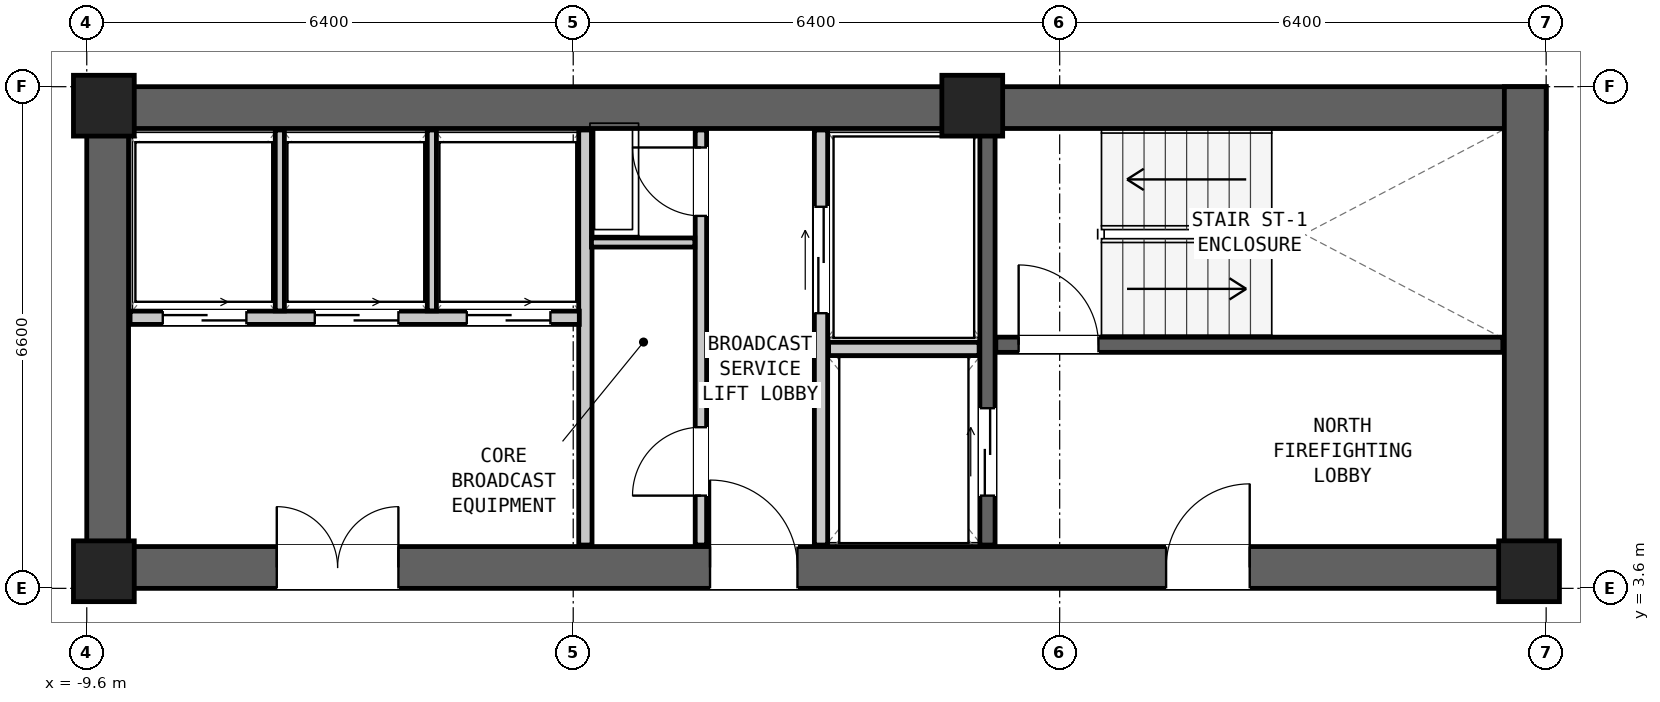
"""IFC4 building model, lengths in metres.
Left out: names, types, materials, properties, quantities, classifications, styles, units other than length and angle.
Written with IfcOpenShell. Run it as: python <this file> out.ifc"""

import sys

from ifc_helpers import new_model, si_unit, direction, frame, frame_2d, origin, origin_2d, place, context, subcontext, project, spatial, rectangle, extrude, element, fill, save


model = new_model("IFC4")
c1 = context("Model", 3, precision=1e-05, world=origin(), true_north=direction((0.0, 1.0)))
c2 = subcontext(c1, "Body", "Model", "MODEL_VIEW")
j1 = project(units=[si_unit("LENGTHUNIT", "METRE"), si_unit("PLANEANGLEUNIT", "RADIAN")], contexts=[c1])
p1 = place(None, origin())
s1 = spatial("IfcSite", under=j1, at=p1, CompositionType="ELEMENT")
p2 = place(p1, origin())
s2 = spatial("IfcBuilding", under=s1, at=p2, CompositionType="ELEMENT")
p3 = place(p2, frame((0.0, 0.0, 29.15)))
s3 = spatial("IfcBuildingStorey", under=s2, at=p3, CompositionType="ELEMENT", Elevation=29.15)
p4 = place(p3, frame((-9.6, 9.925, 0.0), z_axis=(0.0, 0.0, 1.0), x_axis=(1.0, 0.0, 0.0)))
e1 = element("IfcWall", 1, at=p4, inside=s3, PredefinedType="SHEAR", context=c2, shape_type="SweptSolid", body=[
    extrude(rectangle(XDim=19.2, YDim=0.55, at=frame_2d((9.6, 0.0))), origin(), (0.0, 0.0, 1.0), 3.05),
])
p5 = place(p3, frame((-9.6, 3.875, 0.0), z_axis=(0.0, 0.0, 1.0), x_axis=(1.0, 0.0, 0.0)))
e2 = element("IfcWall", 2, at=p5, inside=s3, PredefinedType="SHEAR", context=c2, shape_type="SweptSolid", body=[
    extrude(rectangle(XDim=19.2, YDim=0.55, at=frame_2d((9.6, 0.0))), origin(), (0.0, 0.0, 1.0), 3.05),
])
p6 = place(p5, frame((14.2, 0.0, 0.0)))
e3 = element("IfcOpeningElement", 3, at=p6, cuts=e2, PredefinedType="OPENING", context=c2, shape_type="SweptSolid", body=[
    extrude(rectangle(XDim=1.1, YDim=2.08, at=frame_2d((0.55, 1.04))), frame((0.0, 0.287, 0.0), z_axis=(0.0, -1.0, 0.0), x_axis=(1.0, 0.0, 0.0)), (0.0, 0.0, 1.0), 0.574),
])
p7 = place(p5, frame((8.2, 0.0, 0.0)))
e4 = element("IfcOpeningElement", 4, at=p7, cuts=e2, PredefinedType="OPENING", context=c2, shape_type="SweptSolid", body=[
    extrude(rectangle(XDim=1.15, YDim=2.1, at=frame_2d((0.575, 1.05))), frame((0.0, 0.287, 0.0), z_axis=(0.0, -1.0, 0.0), x_axis=(1.0, 0.0, 0.0)), (0.0, 0.0, 1.0), 0.574),
])
p8 = place(p5, frame((2.5, 0.0, 0.0)))
e5 = element("IfcOpeningElement", 5, at=p8, cuts=e2, PredefinedType="OPENING", context=c2, shape_type="SweptSolid", body=[
    extrude(rectangle(XDim=1.6, YDim=2.12, at=frame_2d((0.8, 1.06))), frame((0.0, 0.287, 0.0), z_axis=(0.0, -1.0, 0.0), x_axis=(1.0, 0.0, 0.0)), (0.0, 0.0, 1.0), 0.574),
])
for number, where, z_axis, x_axis in (
    (6, (-9.325, 3.6, 0.0), (0.0, 0.0, 1.0), (0.0, 1.0, 0.0)),
    (7, (9.325, 3.6, 0.0), (0.0, 0.0, 1.0), (0.0, 1.0, 0.0)),
):
    element("IfcWall", number, at=place(p3, frame(where, z_axis=z_axis, x_axis=x_axis)), inside=s3, PredefinedType="SHEAR", context=c2, shape_type="SweptSolid", body=[
        extrude(rectangle(XDim=6.6, YDim=0.55, at=frame_2d((3.3, 0.0))), origin(), (0.0, 0.0, 1.0), 3.05),
    ])
for number, where, z_axis, x_axis in (
    (8, (-9.375, 9.95, 0.0), (0.0, 0.0, 1.0), (1.0, 0.0, 0.0)),
    (9, (2.05, 9.95, 0.0), (0.0, 0.0, 1.0), (1.0, 0.0, 0.0)),
    (10, (-9.375, 3.825, 0.0), (0.0, 0.0, 1.0), (1.0, 0.0, 0.0)),
    (11, (9.375, 3.825, 0.0), (0.0, 0.0, 1.0), (1.0, 0.0, 0.0)),
):
    element("IfcColumn", number, at=place(p3, frame(where, z_axis=z_axis, x_axis=x_axis)), inside=s3, PredefinedType="COLUMN", context=c2, shape_type="SweptSolid", body=[
        extrude(rectangle(XDim=0.8, YDim=0.8, at=origin_2d()), origin(), (0.0, 0.0, 1.0), 3.05),
    ])
p9 = place(p3, frame((2.36, 6.805, 0.0), z_axis=(0.0, 0.0, 1.0), x_axis=(1.0, 0.0, 0.0)))
e12 = element("IfcWall", 12, at=p9, inside=s3, PredefinedType="SHEAR", context=c2, shape_type="SweptSolid", body=[
    extrude(rectangle(XDim=6.67, YDim=0.2, at=frame_2d((3.335, 0.0))), origin(), (0.0, 0.0, 1.0), 2.83),
])
p10 = place(p9, frame((0.3, 0.0, 0.0)))
e13 = element("IfcOpeningElement", 13, at=p10, cuts=e12, PredefinedType="OPENING", context=c2, shape_type="SweptSolid", body=[
    extrude(rectangle(XDim=1.05, YDim=2.08, at=frame_2d((0.525, 1.04))), frame((0.0, 0.112, 0.0), z_axis=(0.0, -1.0, 0.0), x_axis=(1.0, 0.0, 0.0)), (0.0, 0.0, 1.0), 0.224),
])
p11 = place(p3, frame((2.25, 4.17, 0.0), z_axis=(0.0, 0.0, 1.0), x_axis=(0.0, 1.0, 0.0)))
e14 = element("IfcWall", 14, at=p11, inside=s3, PredefinedType="SHEAR", context=c2, shape_type="SweptSolid", body=[
    extrude(rectangle(XDim=5.46, YDim=0.2, at=frame_2d((2.73, 0.0))), origin(), (0.0, 0.0, 1.0), 2.83),
])
p12 = place(p11, frame((0.65, 0.0, 0.0)))
e15 = element("IfcOpeningElement", 15, at=p12, cuts=e14, PredefinedType="OPENING", context=c2, shape_type="SweptSolid", body=[
    extrude(rectangle(XDim=1.15, YDim=2.08, at=frame_2d((0.575, 1.04))), frame((0.0, 0.112, 0.0), z_axis=(0.0, -1.0, 0.0), x_axis=(1.0, 0.0, 0.0)), (0.0, 0.0, 1.0), 0.224),
])
p13 = place(p3, frame((0.06, 4.17, 0.0), z_axis=(0.0, 0.0, 1.0), x_axis=(0.0, 1.0, 0.0)))
e16 = element("IfcWall", 16, at=p13, inside=s3, PredefinedType="PARTITIONING", context=c2, shape_type="SweptSolid", body=[
    extrude(rectangle(XDim=5.46, YDim=0.175, at=frame_2d((2.73, 0.0))), origin(), (0.0, 0.0, 1.0), 2.83),
])
p14 = place(p13, frame((3.05, 0.0, 0.0)))
e17 = element("IfcOpeningElement", 17, at=p14, cuts=e16, PredefinedType="OPENING", context=c2, shape_type="SweptSolid", body=[
    extrude(rectangle(XDim=1.4, YDim=2.12, at=frame_2d((0.7, 1.06))), frame((0.0, 0.1, 0.0), z_axis=(0.0, -1.0, 0.0), x_axis=(1.0, 0.0, 0.0)), (0.0, 0.0, 1.0), 0.199),
])
p15 = place(p3, frame((0.16, 6.75, 0.0), z_axis=(0.0, 0.0, 1.0), x_axis=(1.0, 0.0, 0.0)))
e18 = element("IfcWall", 18, at=p15, inside=s3, PredefinedType="PARTITIONING", context=c2, shape_type="SweptSolid", body=[
    extrude(rectangle(XDim=1.98, YDim=0.175, at=frame_2d((0.99, 0.0))), origin(), (0.0, 0.0, 1.0), 2.83),
])
p16 = place(p3, frame((-3.04, 4.17, 0.0), z_axis=(0.0, 0.0, 1.0), x_axis=(0.0, 1.0, 0.0)))
e19 = element("IfcWall", 19, at=p16, inside=s3, PredefinedType="PARTITIONING", context=c2, shape_type="SweptSolid", body=[
    extrude(rectangle(XDim=5.46, YDim=0.175, at=frame_2d((2.73, 0.0))), origin(), (0.0, 0.0, 1.0), 2.83),
])
p17 = place(p3, frame((-1.52, 4.17, 0.0), z_axis=(0.0, 0.0, 1.0), x_axis=(0.0, 1.0, 0.0)))
e20 = element("IfcWall", 20, at=p17, inside=s3, PredefinedType="PARTITIONING", context=c2, shape_type="SweptSolid", body=[
    extrude(rectangle(XDim=5.46, YDim=0.15, at=frame_2d((2.73, 0.0))), origin(), (0.0, 0.0, 1.0), 2.83),
])
p18 = place(p17, frame((4.33, 0.0, 0.0)))
e21 = element("IfcOpeningElement", 21, at=p18, cuts=e20, PredefinedType="OPENING", context=c2, shape_type="SweptSolid", body=[
    extrude(rectangle(XDim=0.9, YDim=2.05, at=frame_2d((0.45, 1.025))), frame((0.0, 0.087, 0.0), z_axis=(0.0, -1.0, 0.0), x_axis=(1.0, 0.0, 0.0)), (0.0, 0.0, 1.0), 0.174),
])
p19 = place(p17, frame((0.65, 0.0, 0.0)))
e22 = element("IfcOpeningElement", 22, at=p19, cuts=e20, PredefinedType="OPENING", context=c2, shape_type="SweptSolid", body=[
    extrude(rectangle(XDim=0.9, YDim=2.05, at=frame_2d((0.45, 1.025))), frame((0.0, 0.087, 0.0), z_axis=(0.0, -1.0, 0.0), x_axis=(1.0, 0.0, 0.0)), (0.0, 0.0, 1.0), 0.174),
])
p20 = place(p3, frame((-2.96, 8.15, 0.0), z_axis=(0.0, 0.0, 1.0), x_axis=(1.0, 0.0, 0.0)))
e23 = element("IfcWall", 23, at=p20, inside=s3, PredefinedType="PARTITIONING", context=c2, shape_type="SweptSolid", body=[
    extrude(rectangle(XDim=1.36, YDim=0.12, at=frame_2d((0.68, 0.0))), origin(), (0.0, 0.0, 1.0), 2.83),
])
p21 = place(p3, frame((-9.03, 7.16, 0.0), z_axis=(0.0, 0.0, 1.0), x_axis=(1.0, 0.0, 0.0)))
e24 = element("IfcWall", 24, at=p21, inside=s3, PredefinedType="PARTITIONING", context=c2, shape_type="SweptSolid", body=[
    extrude(rectangle(XDim=5.91, YDim=0.175, at=frame_2d((2.955, 0.0))), origin(), (0.0, 0.0, 1.0), 2.83),
])
p22 = place(p21, frame((0.43, 0.0, 0.0)))
e25 = element("IfcOpeningElement", 25, at=p22, cuts=e24, PredefinedType="OPENING", context=c2, shape_type="SweptSolid", body=[
    extrude(rectangle(XDim=1.1, YDim=2.06, at=frame_2d((0.55, 1.03))), frame((0.0, 0.1, 0.0), z_axis=(0.0, -1.0, 0.0), x_axis=(1.0, 0.0, 0.0)), (0.0, 0.0, 1.0), 0.199),
])
p23 = place(p21, frame((2.43, 0.0, 0.0)))
e26 = element("IfcOpeningElement", 26, at=p23, cuts=e24, PredefinedType="OPENING", context=c2, shape_type="SweptSolid", body=[
    extrude(rectangle(XDim=1.1, YDim=2.06, at=frame_2d((0.55, 1.03))), frame((0.0, 0.1, 0.0), z_axis=(0.0, -1.0, 0.0), x_axis=(1.0, 0.0, 0.0)), (0.0, 0.0, 1.0), 0.199),
])
p24 = place(p21, frame((4.43, 0.0, 0.0)))
e27 = element("IfcOpeningElement", 27, at=p24, cuts=e24, PredefinedType="OPENING", context=c2, shape_type="SweptSolid", body=[
    extrude(rectangle(XDim=1.1, YDim=2.06, at=frame_2d((0.55, 1.03))), frame((0.0, 0.1, 0.0), z_axis=(0.0, -1.0, 0.0), x_axis=(1.0, 0.0, 0.0)), (0.0, 0.0, 1.0), 0.199),
])
for number, where, z_axis, x_axis in (
    (28, (-7.06, 7.25, 0.0), (0.0, 0.0, 1.0), (0.0, 1.0, 0.0)),
    (29, (-5.06, 7.25, 0.0), (0.0, 0.0, 1.0), (0.0, 1.0, 0.0)),
):
    element("IfcWall", number, at=place(p3, frame(where, z_axis=z_axis, x_axis=x_axis)), inside=s3, PredefinedType="PARTITIONING", context=c2, shape_type="SweptSolid", body=[
        extrude(rectangle(XDim=2.38, YDim=0.12, at=frame_2d((1.19, 0.0))), origin(), (0.0, 0.0, 1.0), 2.83),
    ])
p25 = place(p10, origin())
e30 = element("IfcDoor", 30, at=p25, inside=s3, OperationType="SINGLE_SWING_LEFT", PredefinedType="DOOR", context=c2, shape_type="SweptSolid", body=[
    extrude(rectangle(XDim=1.05, YDim=2.08, at=frame_2d((0.525, 1.04))), frame((0.0, 0.025, 0.0), z_axis=(0.0, -1.0, 0.0), x_axis=(1.0, 0.0, 0.0)), (0.0, 0.0, 1.0), 0.05),
])
fill(e13, e30)
p26 = place(p6, origin())
e31 = element("IfcDoor", 31, at=p26, inside=s3, OperationType="SINGLE_SWING_RIGHT", PredefinedType="DOOR", context=c2, shape_type="SweptSolid", body=[
    extrude(rectangle(XDim=1.1, YDim=2.08, at=frame_2d((0.55, 1.04))), frame((0.0, 0.025, 0.0), z_axis=(0.0, -1.0, 0.0), x_axis=(1.0, 0.0, 0.0)), (0.0, 0.0, 1.0), 0.05),
])
fill(e3, e31)
p27 = place(p12, origin())
e32 = element("IfcDoor", 32, at=p27, inside=s3, OperationType="DOUBLE_DOOR_SLIDING", PredefinedType="DOOR", context=c2, shape_type="SweptSolid", body=[
    extrude(rectangle(XDim=1.15, YDim=2.08, at=frame_2d((0.575, 1.04))), frame((0.0, 0.025, 0.0), z_axis=(0.0, -1.0, 0.0), x_axis=(1.0, 0.0, 0.0)), (0.0, 0.0, 1.0), 0.05),
])
fill(e15, e32)
p28 = place(p14, origin())
e33 = element("IfcDoor", 33, at=p28, inside=s3, OperationType="DOUBLE_DOOR_SLIDING", PredefinedType="DOOR", context=c2, shape_type="SweptSolid", body=[
    extrude(rectangle(XDim=1.4, YDim=2.12, at=frame_2d((0.7, 1.06))), frame((0.0, 0.025, 0.0), z_axis=(0.0, -1.0, 0.0), x_axis=(1.0, 0.0, 0.0)), (0.0, 0.0, 1.0), 0.05),
])
fill(e17, e33)
p29 = place(p7, origin())
e34 = element("IfcDoor", 34, at=p29, inside=s3, OperationType="SINGLE_SWING_LEFT", PredefinedType="DOOR", context=c2, shape_type="SweptSolid", body=[
    extrude(rectangle(XDim=1.15, YDim=2.1, at=frame_2d((0.575, 1.05))), frame((0.0, 0.025, 0.0), z_axis=(0.0, -1.0, 0.0), x_axis=(1.0, 0.0, 0.0)), (0.0, 0.0, 1.0), 0.05),
])
fill(e4, e34)
p30 = place(p18, origin())
e35 = element("IfcDoor", 35, at=p30, inside=s3, OperationType="SINGLE_SWING_RIGHT", PredefinedType="DOOR", context=c2, shape_type="SweptSolid", body=[
    extrude(rectangle(XDim=0.9, YDim=2.05, at=frame_2d((0.45, 1.025))), frame((0.0, 0.025, 0.0), z_axis=(0.0, -1.0, 0.0), x_axis=(1.0, 0.0, 0.0)), (0.0, 0.0, 1.0), 0.05),
])
fill(e21, e35)
p31 = place(p19, origin())
e36 = element("IfcDoor", 36, at=p31, inside=s3, OperationType="SINGLE_SWING_LEFT", PredefinedType="DOOR", context=c2, shape_type="SweptSolid", body=[
    extrude(rectangle(XDim=0.9, YDim=2.05, at=frame_2d((0.45, 1.025))), frame((0.0, 0.025, 0.0), z_axis=(0.0, -1.0, 0.0), x_axis=(1.0, 0.0, 0.0)), (0.0, 0.0, 1.0), 0.05),
])
fill(e22, e36)
p32 = place(p22, origin())
e37 = element("IfcDoor", 37, at=p32, inside=s3, OperationType="DOUBLE_DOOR_SLIDING", PredefinedType="DOOR", context=c2, shape_type="SweptSolid", body=[
    extrude(rectangle(XDim=1.1, YDim=2.06, at=frame_2d((0.55, 1.03))), frame((0.0, 0.025, 0.0), z_axis=(0.0, -1.0, 0.0), x_axis=(1.0, 0.0, 0.0)), (0.0, 0.0, 1.0), 0.05),
])
fill(e25, e37)
p33 = place(p23, origin())
e38 = element("IfcDoor", 38, at=p33, inside=s3, OperationType="DOUBLE_DOOR_SLIDING", PredefinedType="DOOR", context=c2, shape_type="SweptSolid", body=[
    extrude(rectangle(XDim=1.1, YDim=2.06, at=frame_2d((0.55, 1.03))), frame((0.0, 0.025, 0.0), z_axis=(0.0, -1.0, 0.0), x_axis=(1.0, 0.0, 0.0)), (0.0, 0.0, 1.0), 0.05),
])
fill(e26, e38)
p34 = place(p24, origin())
e39 = element("IfcDoor", 39, at=p34, inside=s3, OperationType="DOUBLE_DOOR_SLIDING", PredefinedType="DOOR", context=c2, shape_type="SweptSolid", body=[
    extrude(rectangle(XDim=1.1, YDim=2.06, at=frame_2d((0.55, 1.03))), frame((0.0, 0.025, 0.0), z_axis=(0.0, -1.0, 0.0), x_axis=(1.0, 0.0, 0.0)), (0.0, 0.0, 1.0), 0.05),
])
fill(e27, e39)
p35 = place(p8, origin())
e40 = element("IfcDoor", 40, at=p35, inside=s3, OperationType="DOUBLE_DOOR_SINGLE_SWING", PredefinedType="DOOR", context=c2, shape_type="SweptSolid", body=[
    extrude(rectangle(XDim=1.6, YDim=2.12, at=frame_2d((0.8, 1.06))), frame((0.0, 0.025, 0.0), z_axis=(0.0, -1.0, 0.0), x_axis=(1.0, 0.0, 0.0)), (0.0, 0.0, 1.0), 0.05),
])
fill(e5, e40)
save(model, sys.argv[1])
